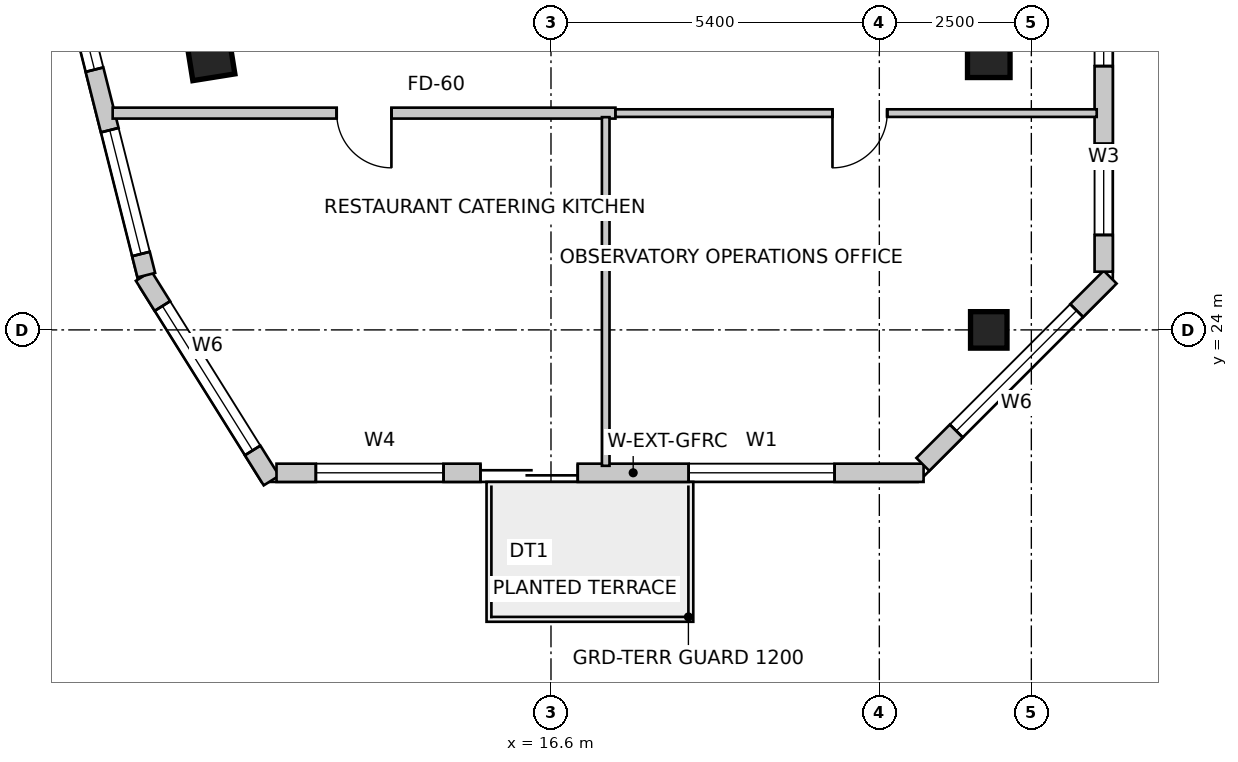
"""IFC4 building model, lengths in metres.
Left out: names, types, materials, properties, quantities, classifications, styles, units other than length and angle.
Written with IfcOpenShell. Run it as: python <this file> out.ifc"""

import sys

from ifc_helpers import new_model, si_unit, direction, frame, frame_2d, origin, origin_2d, place, context, subcontext, project, spatial, rectangle, extrude, source, transform, mapped, element, fill, save


model = new_model("IFC4")
c1 = context("Model", 3, precision=1e-05, world=origin(), true_north=direction((0.0, 1.0)))
c2 = subcontext(c1, "Body", "Model", "MODEL_VIEW")
j1 = project(units=[si_unit("LENGTHUNIT", "METRE"), si_unit("PLANEANGLEUNIT", "RADIAN")], contexts=[c1])
p1 = place(None, origin())
s1 = spatial("IfcSite", under=j1, at=p1, CompositionType="ELEMENT")
p2 = place(p1, origin())
s2 = spatial("IfcBuilding", under=s1, at=p2, CompositionType="ELEMENT")
p3 = place(p2, frame((0.0, 0.0, 300.5)))
s3 = spatial("IfcBuildingStorey", under=s2, at=p3, CompositionType="ELEMENT", Elevation=300.5)
m1 = source(origin(), c2, "Body", "SweptSolid", [
    extrude(rectangle(XDim=0.7, YDim=0.7, at=origin_2d()), origin(), (0.0, 0.0, 1.0), 4.0),
])
for number, where, z_axis, x_axis in (
    (1, (11.0, 28.5, 0.0), (0.0, 0.0, 1.0), (0.158, -0.987, 0.0)),
    (2, (23.8, 28.5, 0.0), (0.0, 0.0, 1.0), (1.0, 0.0, 0.0)),
):
    element("IfcColumn", number, at=place(p3, frame(where, z_axis=z_axis, x_axis=x_axis)), inside=s3, PredefinedType="COLUMN", context=c2, shape_type="MappedRepresentation", body=[
        mapped(m1, transform((0.0, 0.0, 0.0), scale=1.0)),
    ])
m2 = source(origin(), c2, "Body", "SweptSolid", [
    extrude(rectangle(XDim=0.6, YDim=0.6, at=origin_2d()), origin(), (0.0, 0.0, 1.0), 4.0),
])
p4 = place(p3, frame((23.8, 24.0, 0.0), z_axis=(0.0, 0.0, 1.0), x_axis=(1.0, 0.0, 0.0)))
e3 = element("IfcColumn", 3, at=p4, inside=s3, PredefinedType="COLUMN", context=c2, shape_type="MappedRepresentation", body=[
    mapped(m2, transform((0.0, 0.0, 0.0), scale=1.0)),
])
p5 = place(p3, frame((9.9, 24.887, 0.0), z_axis=(0.0, 0.0, 1.0), x_axis=(0.530004471907, -0.84799484654, 0.0)))
e4 = element("IfcWall", 4, at=p5, inside=s3, PredefinedType="SOLIDWALL", context=c2, shape_type="SweptSolid", body=[
    extrude(rectangle(XDim=3.967, YDim=0.3, at=frame_2d((1.983, 0.0))), origin(), (0.0, 0.0, 1.0), 3.7),
])
m3 = source(origin(), c2, "Body", "SweptSolid", [
    extrude(rectangle(XDim=2.8, YDim=2.4, at=frame_2d((1.4, 1.2))), frame((0.0, 0.16, 0.0), z_axis=(0.0, -1.0, 0.0), x_axis=(1.0, 0.0, 0.0)), (0.0, 0.0, 1.0), 0.32),
])
p6 = place(p5, frame((0.583, 0.0, 0.85)))
e5 = element("IfcOpeningElement", 5, at=p6, cuts=e4, PredefinedType="OPENING", context=c2, shape_type="MappedRepresentation", body=[
    mapped(m3, transform((0.0, 0.0, 0.0), scale=1.0)),
])
p7 = place(p3, frame((12.086, 21.65, 0.0), z_axis=(0.0, 0.0, 1.0), x_axis=(1.0, 0.0, 0.0)))
e6 = element("IfcWall", 6, at=p7, inside=s3, PredefinedType="SOLIDWALL", context=c2, shape_type="SweptSolid", body=[
    extrude(rectangle(XDim=10.642, YDim=0.3, at=frame_2d((5.321, 0.0))), origin(), (0.0, 0.0, 1.0), 3.7),
])
m4 = source(origin(), c2, "Body", "SweptSolid", [
    extrude(rectangle(XDim=1.6, YDim=2.15, at=frame_2d((0.8, 1.075))), frame((0.0, 0.16, 0.0), z_axis=(0.0, -1.0, 0.0), x_axis=(1.0, 0.0, 0.0)), (0.0, 0.0, 1.0), 0.32),
])
p8 = place(p7, frame((3.354, 0.0, 0.0)))
e7 = element("IfcOpeningElement", 7, at=p8, cuts=e6, PredefinedType="OPENING", context=c2, shape_type="MappedRepresentation", body=[
    mapped(m4, transform((0.0, 0.0, 0.0), scale=1.0)),
])
m5 = source(origin(), c2, "Body", "SweptSolid", [
    extrude(rectangle(XDim=2.1, YDim=2.0, at=frame_2d((1.05, 1.0))), frame((0.0, 0.16, 0.0), z_axis=(0.0, -1.0, 0.0), x_axis=(1.0, 0.0, 0.0)), (0.0, 0.0, 1.0), 0.32),
])
p9 = place(p7, frame((0.647, 0.0, 0.85)))
e8 = element("IfcOpeningElement", 8, at=p9, cuts=e6, PredefinedType="OPENING", context=c2, shape_type="MappedRepresentation", body=[
    mapped(m5, transform((0.0, 0.0, 0.0), scale=1.0)),
])
m6 = source(origin(), c2, "Body", "SweptSolid", [
    extrude(rectangle(XDim=2.4, YDim=2.2, at=frame_2d((1.2, 1.1))), frame((0.0, 0.16, 0.0), z_axis=(0.0, -1.0, 0.0), x_axis=(1.0, 0.0, 0.0)), (0.0, 0.0, 1.0), 0.32),
])
p10 = place(p7, frame((6.778, 0.0, 0.85)))
e9 = element("IfcOpeningElement", 9, at=p10, cuts=e6, PredefinedType="OPENING", context=c2, shape_type="MappedRepresentation", body=[
    mapped(m6, transform((0.0, 0.0, 0.0), scale=1.0)),
])
p11 = place(p3, frame((22.716, 21.788, 0.0), z_axis=(0.0, 0.0, 1.0), x_axis=(0.707134803727, 0.707078757535, 0.0)))
e10 = element("IfcWall", 10, at=p11, inside=s3, PredefinedType="SOLIDWALL", context=c2, shape_type="SweptSolid", body=[
    extrude(rectangle(XDim=4.356, YDim=0.3, at=frame_2d((2.178, 0.0))), origin(), (0.0, 0.0, 1.0), 3.7),
])
p12 = place(p11, frame((0.778, 0.0, 0.85)))
e11 = element("IfcOpeningElement", 11, at=p12, cuts=e10, PredefinedType="OPENING", context=c2, shape_type="MappedRepresentation", body=[
    mapped(m3, transform((0.0, 0.0, 0.0), scale=1.0)),
])
p13 = place(p3, frame((25.69, 24.957, 0.0), z_axis=(0.0, 0.0, 1.0), x_axis=(0.0, 1.0, 0.0)))
e12 = element("IfcWall", 12, at=p13, inside=s3, PredefinedType="SOLIDWALL", context=c2, shape_type="SweptSolid", body=[
    extrude(rectangle(XDim=6.655, YDim=0.3, at=frame_2d((3.327, 0.0))), origin(), (0.0, 0.0, 1.0), 3.7),
])
m7 = source(origin(), c2, "Body", "SweptSolid", [
    extrude(rectangle(XDim=1.5, YDim=1.8, at=frame_2d((0.75, 0.9))), frame((0.0, 0.16, 0.0), z_axis=(0.0, -1.0, 0.0), x_axis=(1.0, 0.0, 0.0)), (0.0, 0.0, 1.0), 0.32),
])
p14 = place(p13, frame((0.604, 0.0, 0.85)))
e13 = element("IfcOpeningElement", 13, at=p14, cuts=e12, PredefinedType="OPENING", context=c2, shape_type="MappedRepresentation", body=[
    mapped(m7, transform((0.0, 0.0, 0.0), scale=1.0)),
])
p15 = place(p13, frame((3.381, 0.0, 0.85)))
e14 = element("IfcOpeningElement", 14, at=p15, cuts=e12, PredefinedType="OPENING", context=c2, shape_type="MappedRepresentation", body=[
    mapped(m6, transform((0.0, 0.0, 0.0), scale=1.0)),
])
p16 = place(p3, frame((8.196, 31.835, 0.0), z_axis=(0.0, 0.0, 1.0), x_axis=(0.244430846523, -0.969666726906, 0.0)))
e15 = element("IfcWall", 15, at=p16, inside=s3, PredefinedType="SOLIDWALL", context=c2, shape_type="SweptSolid", body=[
    extrude(rectangle(XDim=7.152, YDim=0.3, at=frame_2d((3.576, 0.0))), origin(), (0.0, 0.0, 1.0), 3.7),
])
p17 = place(p16, frame((0.866, 0.0, 0.85)))
e16 = element("IfcOpeningElement", 16, at=p17, cuts=e15, PredefinedType="OPENING", context=c2, shape_type="MappedRepresentation", body=[
    mapped(m3, transform((0.0, 0.0, 0.0), scale=1.0)),
])
p18 = place(p16, frame((4.692, 0.0, 0.85)))
e17 = element("IfcOpeningElement", 17, at=p18, cuts=e15, PredefinedType="OPENING", context=c2, shape_type="MappedRepresentation", body=[
    mapped(m5, transform((0.0, 0.0, 0.0), scale=1.0)),
])
p19 = place(p3, frame((17.66, 27.565, 0.0), z_axis=(0.0, 0.0, 1.0), x_axis=(-1.0, 0.0, 0.0)))
e18 = element("IfcWall", 18, at=p19, inside=s3, PredefinedType="PARTITIONING", context=c2, shape_type="SweptSolid", body=[
    extrude(rectangle(XDim=8.269, YDim=0.18, at=frame_2d((4.134, 0.0))), origin(), (0.0, 0.0, 1.0), 3.384),
])
m8 = source(origin(), c2, "Body", "SweptSolid", [
    extrude(rectangle(XDim=0.9, YDim=2.15, at=frame_2d((0.45, 1.075))), frame((0.0, 0.1, 0.0), z_axis=(0.0, -1.0, 0.0), x_axis=(1.0, 0.0, 0.0)), (0.0, 0.0, 1.0), 0.2),
])
p20 = place(p19, frame((3.684, 0.0, 0.0)))
e19 = element("IfcOpeningElement", 19, at=p20, cuts=e18, PredefinedType="OPENING", context=c2, shape_type="MappedRepresentation", body=[
    mapped(m8, transform((0.0, 0.0, 0.0), scale=1.0)),
])
p21 = place(p3, frame((25.575, 27.565, 0.0), z_axis=(0.0, 0.0, 1.0), x_axis=(-1.0, 0.0, 0.0)))
e20 = element("IfcWall", 20, at=p21, inside=s3, PredefinedType="PARTITIONING", context=c2, shape_type="SweptSolid", body=[
    extrude(rectangle(XDim=7.913, YDim=0.125, at=frame_2d((3.957, 0.0))), origin(), (0.0, 0.0, 1.0), 2.992),
])
m9 = source(origin(), c2, "Body", "SweptSolid", [
    extrude(rectangle(XDim=0.9, YDim=2.15, at=frame_2d((0.45, 1.075))), frame((0.0, 0.073, 0.0), z_axis=(0.0, -1.0, 0.0), x_axis=(1.0, 0.0, 0.0)), (0.0, 0.0, 1.0), 0.145),
])
p22 = place(p21, frame((3.446, 0.0, 0.0)))
e21 = element("IfcOpeningElement", 21, at=p22, cuts=e20, PredefinedType="OPENING", context=c2, shape_type="MappedRepresentation", body=[
    mapped(m9, transform((0.0, 0.0, 0.0), scale=1.0)),
])
p23 = place(p3, frame((17.5, 27.499, 0.0), z_axis=(0.0, 0.0, 1.0), x_axis=(0.0, -1.0, 0.0)))
e22 = element("IfcWall", 22, at=p23, inside=s3, PredefinedType="PARTITIONING", context=c2, shape_type="SweptSolid", body=[
    extrude(rectangle(XDim=5.734, YDim=0.125, at=frame_2d((2.867, 0.0))), origin(), (0.0, 0.0, 1.0), 3.384),
])
m10 = source(origin(), c2, "Body", "SweptSolid", [
    extrude(rectangle(XDim=2.8, YDim=2.4, at=frame_2d((1.4, 1.2))), frame((0.0, -0.015, 0.0), z_axis=(0.0, -1.0, 0.0), x_axis=(1.0, 0.0, 0.0)), (0.0, 0.0, 1.0), 0.06),
])
p24 = place(p6, origin())
e23 = element("IfcWindow", 23, at=p24, inside=s3, PartitioningType="SINGLE_PANEL", PredefinedType="WINDOW", context=c2, shape_type="MappedRepresentation", body=[
    mapped(m10, transform((0.0, 0.0, 0.0), scale=1.0)),
])
fill(e5, e23)
m11 = source(origin(), c2, "Body", "SweptSolid", [
    extrude(rectangle(XDim=1.6, YDim=2.15, at=frame_2d((0.8, 1.075))), frame((0.0, 0.025, 0.0), z_axis=(0.0, -1.0, 0.0), x_axis=(1.0, 0.0, 0.0)), (0.0, 0.0, 1.0), 0.05),
])
p25 = place(p8, origin())
e24 = element("IfcDoor", 24, at=p25, inside=s3, OperationType="DOUBLE_DOOR_SLIDING", PredefinedType="DOOR", context=c2, shape_type="MappedRepresentation", body=[
    mapped(m11, transform((0.0, 0.0, 0.0), scale=1.0)),
])
fill(e7, e24)
m12 = source(origin(), c2, "Body", "SweptSolid", [
    extrude(rectangle(XDim=2.1, YDim=2.0, at=frame_2d((1.05, 1.0))), frame((0.0, -0.015, 0.0), z_axis=(0.0, -1.0, 0.0), x_axis=(1.0, 0.0, 0.0)), (0.0, 0.0, 1.0), 0.06),
])
p26 = place(p9, origin())
e25 = element("IfcWindow", 25, at=p26, inside=s3, PartitioningType="SINGLE_PANEL", PredefinedType="WINDOW", context=c2, shape_type="MappedRepresentation", body=[
    mapped(m12, transform((0.0, 0.0, 0.0), scale=1.0)),
])
fill(e8, e25)
m13 = source(origin(), c2, "Body", "SweptSolid", [
    extrude(rectangle(XDim=2.4, YDim=2.2, at=frame_2d((1.2, 1.1))), frame((0.0, -0.015, 0.0), z_axis=(0.0, -1.0, 0.0), x_axis=(1.0, 0.0, 0.0)), (0.0, 0.0, 1.0), 0.06),
])
p27 = place(p10, origin())
e26 = element("IfcWindow", 26, at=p27, inside=s3, PartitioningType="SINGLE_PANEL", PredefinedType="WINDOW", context=c2, shape_type="MappedRepresentation", body=[
    mapped(m13, transform((0.0, 0.0, 0.0), scale=1.0)),
])
fill(e9, e26)
p28 = place(p12, origin())
e27 = element("IfcWindow", 27, at=p28, inside=s3, PartitioningType="SINGLE_PANEL", PredefinedType="WINDOW", context=c2, shape_type="MappedRepresentation", body=[
    mapped(m10, transform((0.0, 0.0, 0.0), scale=1.0)),
])
fill(e11, e27)
m14 = source(origin(), c2, "Body", "SweptSolid", [
    extrude(rectangle(XDim=1.5, YDim=1.8, at=frame_2d((0.75, 0.9))), frame((0.0, -0.015, 0.0), z_axis=(0.0, -1.0, 0.0), x_axis=(1.0, 0.0, 0.0)), (0.0, 0.0, 1.0), 0.06),
])
p29 = place(p14, origin())
e28 = element("IfcWindow", 28, at=p29, inside=s3, PartitioningType="SINGLE_PANEL", PredefinedType="WINDOW", context=c2, shape_type="MappedRepresentation", body=[
    mapped(m14, transform((0.0, 0.0, 0.0), scale=1.0)),
])
fill(e13, e28)
p30 = place(p15, origin())
e29 = element("IfcWindow", 29, at=p30, inside=s3, PartitioningType="SINGLE_PANEL", PredefinedType="WINDOW", context=c2, shape_type="MappedRepresentation", body=[
    mapped(m13, transform((0.0, 0.0, 0.0), scale=1.0)),
])
fill(e14, e29)
p31 = place(p17, origin())
e30 = element("IfcWindow", 30, at=p31, inside=s3, PartitioningType="SINGLE_PANEL", PredefinedType="WINDOW", context=c2, shape_type="MappedRepresentation", body=[
    mapped(m10, transform((0.0, 0.0, 0.0), scale=1.0)),
])
fill(e16, e30)
p32 = place(p18, origin())
e31 = element("IfcWindow", 31, at=p32, inside=s3, PartitioningType="SINGLE_PANEL", PredefinedType="WINDOW", context=c2, shape_type="MappedRepresentation", body=[
    mapped(m12, transform((0.0, 0.0, 0.0), scale=1.0)),
])
fill(e17, e31)
m15 = source(origin(), c2, "Body", "SweptSolid", [
    extrude(rectangle(XDim=0.9, YDim=2.15, at=frame_2d((0.45, 1.075))), frame((0.0, 0.025, 0.0), z_axis=(0.0, -1.0, 0.0), x_axis=(1.0, 0.0, 0.0)), (0.0, 0.0, 1.0), 0.05),
])
p33 = place(p20, origin())
e32 = element("IfcDoor", 32, at=p33, inside=s3, OperationType="SINGLE_SWING_LEFT", PredefinedType="DOOR", context=c2, shape_type="MappedRepresentation", body=[
    mapped(m15, transform((0.0, 0.0, 0.0), scale=1.0)),
])
fill(e19, e32)
m16 = source(origin(), c2, "Body", "SweptSolid", [
    extrude(rectangle(XDim=0.9, YDim=2.15, at=frame_2d((0.45, 1.075))), frame((0.0, 0.025, 0.0), z_axis=(0.0, -1.0, 0.0), x_axis=(1.0, 0.0, 0.0)), (0.0, 0.0, 1.0), 0.05),
])
p34 = place(p22, origin())
e33 = element("IfcDoor", 33, at=p34, inside=s3, OperationType="SINGLE_SWING_RIGHT", PredefinedType="DOOR", context=c2, shape_type="MappedRepresentation", body=[
    mapped(m16, transform((0.0, 0.0, 0.0), scale=1.0)),
])
fill(e21, e33)
save(model, sys.argv[1])
